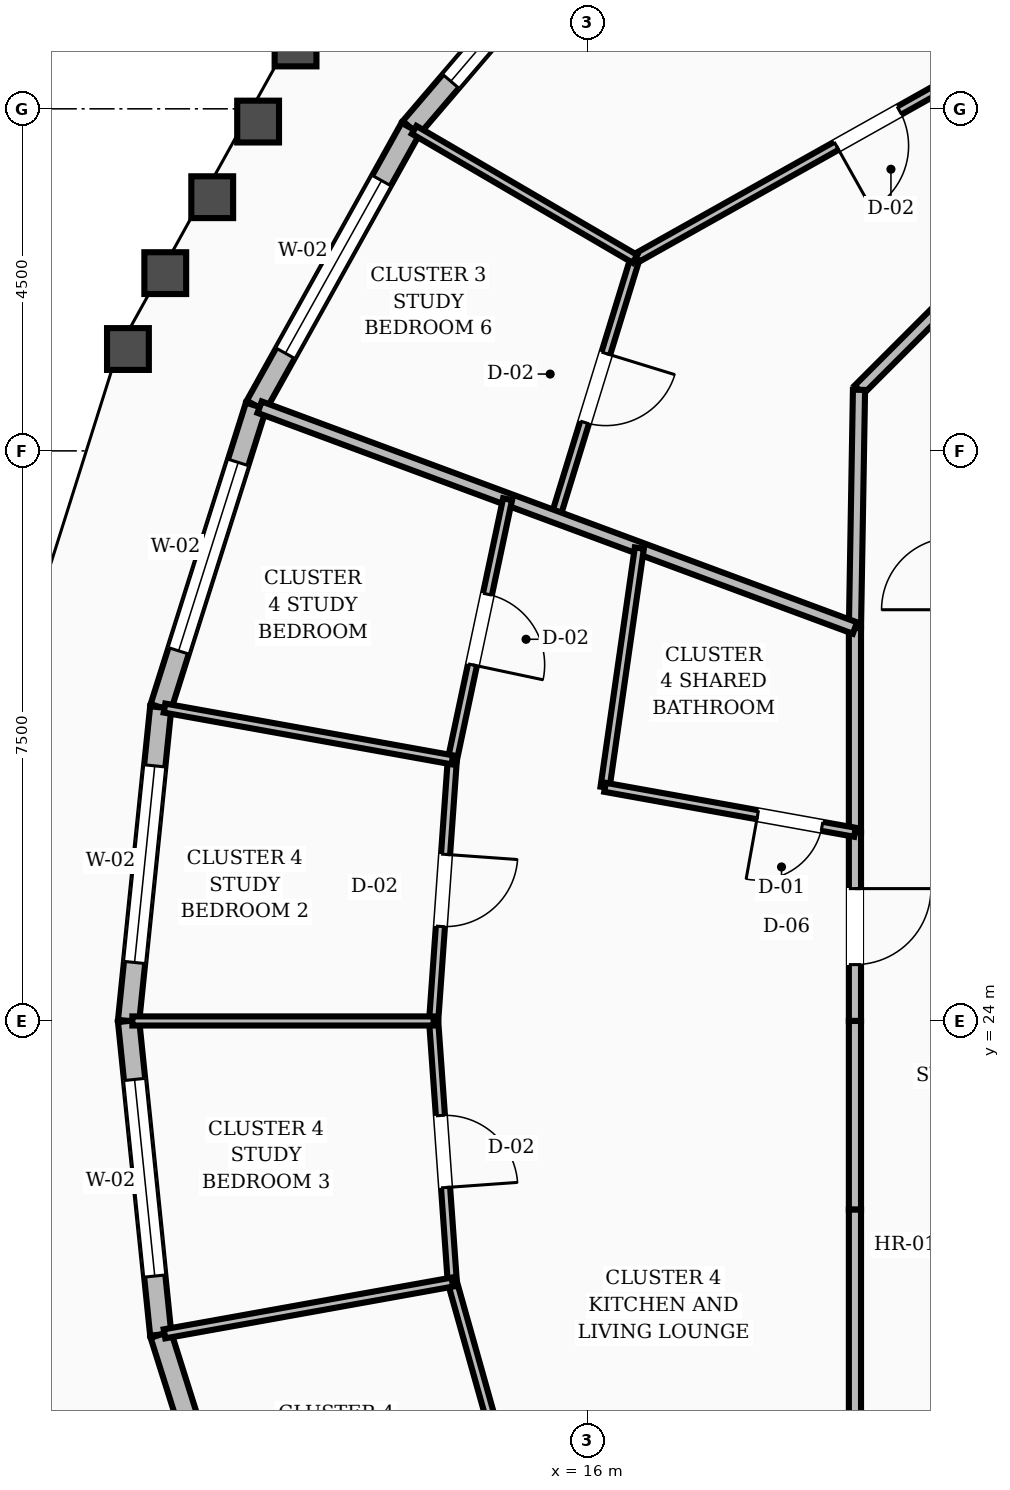
"""IFC4 building model, lengths in metres.
Left out: names, types, materials, properties, quantities, classifications, styles, units other than length and angle.
Written with IfcOpenShell. Run it as: python <this file> out.ifc"""

import sys

from ifc_helpers import new_model, si_unit, direction, frame, frame_2d, origin, place, context, subcontext, project, spatial, rectangle, extrude, element, fill, save


model = new_model("IFC4")
c1 = context("Model", 3, precision=1e-05, world=origin(), true_north=direction((0.0, 1.0)))
c2 = subcontext(c1, "Body", "Model", "MODEL_VIEW")
j1 = project(units=[si_unit("LENGTHUNIT", "METRE"), si_unit("PLANEANGLEUNIT", "RADIAN")], contexts=[c1])
p1 = place(None, origin())
s1 = spatial("IfcSite", under=j1, at=p1, CompositionType="ELEMENT")
p2 = place(p1, origin())
s2 = spatial("IfcBuilding", under=s1, at=p2, CompositionType="ELEMENT")
p3 = place(p2, frame((0.0, 0.0, 236.4)))
s3 = spatial("IfcBuildingStorey", under=s2, at=p3, CompositionType="ELEMENT", Elevation=236.4)
p4 = place(p3, frame((16.418, 38.953, 0.0), z_axis=(0.0, 0.0, 1.0), x_axis=(-0.64992790189, -0.759995869952, 0.0)))
e1 = element("IfcWall", 1, at=p4, inside=s3, PredefinedType="STANDARD", context=c2, shape_type="SweptSolid", body=[
    extrude(rectangle(XDim=4.217, YDim=0.28, at=frame_2d((2.108, 0.0))), origin(), (0.0, 0.0, 1.0), 2.88),
])
p5 = place(p4, frame((0.808, 0.0, 0.8)))
e2 = element("IfcOpeningElement", 2, at=p5, cuts=e1, PredefinedType="OPENING", context=c2, shape_type="SweptSolid", body=[
    extrude(rectangle(XDim=2.6, YDim=1.65, at=frame_2d((1.3, 0.825))), frame((0.0, 0.15, 0.0), z_axis=(0.0, -1.0, 0.0), x_axis=(1.0, 0.0, 0.0)), (0.0, 0.0, 1.0), 0.3),
])
p6 = place(p3, frame((13.677, 35.748, 0.0), z_axis=(0.0, 0.0, 1.0), x_axis=(-0.486628377496, -0.873609078602, 0.0)))
e3 = element("IfcWall", 3, at=p6, inside=s3, PredefinedType="STANDARD", context=c2, shape_type="SweptSolid", body=[
    extrude(rectangle(XDim=4.185, YDim=0.28, at=frame_2d((2.092, 0.0))), origin(), (0.0, 0.0, 1.0), 2.88),
])
p7 = place(p6, frame((0.792, 0.0, 0.8)))
e4 = element("IfcOpeningElement", 4, at=p7, cuts=e3, PredefinedType="OPENING", context=c2, shape_type="SweptSolid", body=[
    extrude(rectangle(XDim=2.6, YDim=1.65, at=frame_2d((1.3, 0.825))), frame((0.0, 0.15, 0.0), z_axis=(0.0, -1.0, 0.0), x_axis=(1.0, 0.0, 0.0)), (0.0, 0.0, 1.0), 0.3),
])
p8 = place(p3, frame((11.641, 32.092, 0.0), z_axis=(0.0, 0.0, 1.0), x_axis=(-0.301400977057, -0.953497483494, 0.0)))
e5 = element("IfcWall", 5, at=p8, inside=s3, PredefinedType="STANDARD", context=c2, shape_type="SweptSolid", body=[
    extrude(rectangle(XDim=4.16, YDim=0.28, at=frame_2d((2.08, 0.0))), origin(), (0.0, 0.0, 1.0), 2.88),
])
p9 = place(p8, frame((0.78, 0.0, 0.8)))
e6 = element("IfcOpeningElement", 6, at=p9, cuts=e5, PredefinedType="OPENING", context=c2, shape_type="SweptSolid", body=[
    extrude(rectangle(XDim=2.6, YDim=1.65, at=frame_2d((1.3, 0.825))), frame((0.0, 0.15, 0.0), z_axis=(0.0, -1.0, 0.0), x_axis=(1.0, 0.0, 0.0)), (0.0, 0.0, 1.0), 0.3),
])
p10 = place(p3, frame((10.387, 28.125, 0.0), z_axis=(0.0, 0.0, 1.0), x_axis=(-0.102137908712, -0.994770248652, 0.0)))
e7 = element("IfcWall", 7, at=p10, inside=s3, PredefinedType="STANDARD", context=c2, shape_type="SweptSolid", body=[
    extrude(rectangle(XDim=4.147, YDim=0.28, at=frame_2d((2.074, 0.0))), origin(), (0.0, 0.0, 1.0), 2.88),
])
p11 = place(p10, frame((0.773, 0.0, 0.8)))
e8 = element("IfcOpeningElement", 8, at=p11, cuts=e7, PredefinedType="OPENING", context=c2, shape_type="SweptSolid", body=[
    extrude(rectangle(XDim=2.6, YDim=1.65, at=frame_2d((1.3, 0.825))), frame((0.0, 0.15, 0.0), z_axis=(0.0, -1.0, 0.0), x_axis=(1.0, 0.0, 0.0)), (0.0, 0.0, 1.0), 0.3),
])
p12 = place(p3, frame((9.964, 24.0, 0.0), z_axis=(0.0, 0.0, 1.0), x_axis=(0.102137908712, -0.994770248652, 0.0)))
e9 = element("IfcWall", 9, at=p12, inside=s3, PredefinedType="STANDARD", context=c2, shape_type="SweptSolid", body=[
    extrude(rectangle(XDim=4.147, YDim=0.28, at=frame_2d((2.074, 0.0))), origin(), (0.0, 0.0, 1.0), 2.88),
])
p13 = place(p12, frame((0.773, 0.0, 0.8)))
e10 = element("IfcOpeningElement", 10, at=p13, cuts=e9, PredefinedType="OPENING", context=c2, shape_type="SweptSolid", body=[
    extrude(rectangle(XDim=2.6, YDim=1.65, at=frame_2d((1.3, 0.825))), frame((0.0, 0.15, 0.0), z_axis=(0.0, -1.0, 0.0), x_axis=(1.0, 0.0, 0.0)), (0.0, 0.0, 1.0), 0.3),
])
p14 = place(p3, frame((10.387, 19.875, 0.0), z_axis=(0.0, 0.0, 1.0), x_axis=(0.301400977057, -0.953497483494, 0.0)))
e11 = element("IfcWall", 11, at=p14, inside=s3, PredefinedType="STANDARD", context=c2, shape_type="SweptSolid", body=[
    extrude(rectangle(XDim=4.16, YDim=0.28, at=frame_2d((2.08, 0.0))), origin(), (0.0, 0.0, 1.0), 2.88),
])
p15 = place(p3, frame((21.635, 34.365, 0.0), z_axis=(0.0, 0.0, 1.0), x_axis=(-0.707106781187, -0.707106781187, 0.0)))
e12 = element("IfcWall", 12, at=p15, inside=s3, PredefinedType="SOLIDWALL", context=c2, shape_type="SweptSolid", body=[
    extrude(rectangle(XDim=2.916, YDim=0.16, at=frame_2d((1.458, 0.0))), origin(), (0.0, 0.0, 1.0), 2.87),
])
p16 = place(p3, frame((19.573, 32.303, 0.0), z_axis=(0.0, 0.0, 1.0), x_axis=(-0.016981035134, -0.999855811828, 0.0)))
e13 = element("IfcWall", 13, at=p16, inside=s3, PredefinedType="SOLIDWALL", context=c2, shape_type="SweptSolid", body=[
    extrude(rectangle(XDim=3.134, YDim=0.16, at=frame_2d((1.567, 0.0))), origin(), (0.0, 0.0, 1.0), 2.87),
])
p17 = place(p3, frame((19.52, 29.169, 0.0), z_axis=(0.0, 0.0, 1.0), x_axis=(0.0, -1.0, 0.0)))
e14 = element("IfcWall", 14, at=p17, inside=s3, PredefinedType="SOLIDWALL", context=c2, shape_type="SweptSolid", body=[
    extrude(rectangle(XDim=2.687, YDim=0.16, at=frame_2d((1.344, 0.0))), origin(), (0.0, 0.0, 1.0), 2.87),
])
p18 = place(p3, frame((19.52, 26.482, 0.0), z_axis=(0.0, 0.0, 1.0), x_axis=(0.0, -1.0, 0.0)))
e15 = element("IfcWall", 15, at=p18, inside=s3, PredefinedType="SOLIDWALL", context=c2, shape_type="SweptSolid", body=[
    extrude(rectangle(XDim=2.482, YDim=0.16, at=frame_2d((1.241, 0.0))), origin(), (0.0, 0.0, 1.0), 2.87),
])
p19 = place(p18, frame((0.741, 0.0, 0.0)))
e16 = element("IfcOpeningElement", 16, at=p19, cuts=e15, PredefinedType="OPENING", context=c2, shape_type="SweptSolid", body=[
    extrude(rectangle(XDim=1.0, YDim=2.1, at=frame_2d((0.5, 1.05))), frame((0.0, 0.09, 0.0), z_axis=(0.0, -1.0, 0.0), x_axis=(1.0, 0.0, 0.0)), (0.0, 0.0, 1.0), 0.18),
])
p20 = place(p3, frame((19.52, 24.0, 0.0), z_axis=(0.0, 0.0, 1.0), x_axis=(0.0, -1.0, 0.0)))
e17 = element("IfcWall", 17, at=p20, inside=s3, PredefinedType="SOLIDWALL", context=c2, shape_type="SweptSolid", body=[
    extrude(rectangle(XDim=2.482, YDim=0.16, at=frame_2d((1.241, 0.0))), origin(), (0.0, 0.0, 1.0), 2.87),
])
p21 = place(p3, frame((19.52, 21.518, 0.0), z_axis=(0.0, 0.0, 1.0), x_axis=(0.0, -1.0, 0.0)))
e18 = element("IfcWall", 18, at=p21, inside=s3, PredefinedType="SOLIDWALL", context=c2, shape_type="SweptSolid", body=[
    extrude(rectangle(XDim=2.687, YDim=0.16, at=frame_2d((1.344, 0.0))), origin(), (0.0, 0.0, 1.0), 2.87),
])
p22 = place(p3, frame((22.755, 37.466, 0.0), z_axis=(0.0, 0.0, 1.0), x_axis=(-0.872022279864, -0.489466182102, 0.0)))
e19 = element("IfcWall", 19, at=p22, inside=s3, PredefinedType="PARTITIONING", context=c2, shape_type="SweptSolid", body=[
    extrude(rectangle(XDim=7.029, YDim=0.12, at=frame_2d((3.515, 0.0))), origin(), (0.0, 0.0, 1.0), 2.87),
])
p23 = place(p22, frame((3.04, 0.0, 0.0)))
e20 = element("IfcOpeningElement", 20, at=p23, cuts=e19, PredefinedType="OPENING", context=c2, shape_type="SweptSolid", body=[
    extrude(rectangle(XDim=0.95, YDim=2.1, at=frame_2d((0.475, 1.05))), frame((0.0, 0.07, 0.0), z_axis=(0.0, -1.0, 0.0), x_axis=(1.0, 0.0, 0.0)), (0.0, 0.0, 1.0), 0.14),
])
p24 = place(p3, frame((16.625, 34.026, 0.0), z_axis=(0.0, 0.0, 1.0), x_axis=(-0.294182446775, -0.955749280936, 0.0)))
e21 = element("IfcWall", 21, at=p24, inside=s3, PredefinedType="PARTITIONING", context=c2, shape_type="SweptSolid", body=[
    extrude(rectangle(XDim=3.552, YDim=0.12, at=frame_2d((1.776, 0.0))), origin(), (0.0, 0.0, 1.0), 2.87),
])
p25 = place(p24, frame((1.301, 0.0, 0.0)))
e22 = element("IfcOpeningElement", 22, at=p25, cuts=e21, PredefinedType="OPENING", context=c2, shape_type="SweptSolid", body=[
    extrude(rectangle(XDim=0.95, YDim=2.1, at=frame_2d((0.475, 1.05))), frame((0.0, 0.07, 0.0), z_axis=(0.0, -1.0, 0.0), x_axis=(1.0, 0.0, 0.0)), (0.0, 0.0, 1.0), 0.14),
])
p26 = place(p3, frame((16.625, 34.026, 0.0), z_axis=(0.0, 0.0, 1.0), x_axis=(-0.863415459889, 0.504493551618, 0.0)))
e23 = element("IfcWall", 23, at=p26, inside=s3, PredefinedType="PARTITIONING", context=c2, shape_type="SweptSolid", body=[
    extrude(rectangle(XDim=3.364, YDim=0.12, at=frame_2d((1.682, 0.0))), origin(), (0.0, 0.0, 1.0), 2.87),
])
p27 = place(p3, frame((19.52, 29.169, 0.0), z_axis=(0.0, 0.0, 1.0), x_axis=(-0.93756283665, 0.347815938871, 0.0)))
e24 = element("IfcWall", 24, at=p27, inside=s3, PredefinedType="SOLIDWALL", context=c2, shape_type="SweptSolid", body=[
    extrude(rectangle(XDim=8.354, YDim=0.16, at=frame_2d((4.177, 0.0))), origin(), (0.0, 0.0, 1.0), 2.87),
])
p28 = place(p3, frame((16.684, 30.222, 0.0), z_axis=(0.0, 0.0, 1.0), x_axis=(-0.141958767182, -0.989872571809, 0.0)))
e25 = element("IfcWall", 25, at=p28, inside=s3, PredefinedType="PARTITIONING", context=c2, shape_type="SweptSolid", body=[
    extrude(rectangle(XDim=3.18, YDim=0.12, at=frame_2d((1.59, 0.0))), origin(), (0.0, 0.0, 1.0), 2.87),
])
p29 = place(p3, frame((19.52, 26.482, 0.0), z_axis=(0.0, 0.0, 1.0), x_axis=(-0.984196827571, 0.177077961922, 0.0)))
e26 = element("IfcWall", 26, at=p29, inside=s3, PredefinedType="PARTITIONING", context=c2, shape_type="SweptSolid", body=[
    extrude(rectangle(XDim=3.341, YDim=0.12, at=frame_2d((1.67, 0.0))), origin(), (0.0, 0.0, 1.0), 2.87),
])
p30 = place(p29, frame((0.44, 0.0, 0.0)))
e27 = element("IfcOpeningElement", 27, at=p30, cuts=e26, PredefinedType="OPENING", context=c2, shape_type="SweptSolid", body=[
    extrude(rectangle(XDim=0.86, YDim=2.1, at=frame_2d((0.43, 1.05))), frame((0.0, 0.07, 0.0), z_axis=(0.0, -1.0, 0.0), x_axis=(1.0, 0.0, 0.0)), (0.0, 0.0, 1.0), 0.14),
])
p31 = place(p3, frame((14.95, 30.865, 0.0), z_axis=(0.0, 0.0, 1.0), x_axis=(-0.207459780038, -0.978243548237, 0.0)))
e28 = element("IfcWall", 28, at=p31, inside=s3, PredefinedType="PARTITIONING", context=c2, shape_type="SweptSolid", body=[
    extrude(rectangle(XDim=3.506, YDim=0.12, at=frame_2d((1.753, 0.0))), origin(), (0.0, 0.0, 1.0), 2.87),
])
p32 = place(p31, frame((1.278, 0.0, 0.0)))
e29 = element("IfcOpeningElement", 29, at=p32, cuts=e28, PredefinedType="OPENING", context=c2, shape_type="SweptSolid", body=[
    extrude(rectangle(XDim=0.95, YDim=2.1, at=frame_2d((0.475, 1.05))), frame((0.0, 0.07, 0.0), z_axis=(0.0, -1.0, 0.0), x_axis=(1.0, 0.0, 0.0)), (0.0, 0.0, 1.0), 0.14),
])
p33 = place(p3, frame((14.223, 27.435, 0.0), z_axis=(0.0, 0.0, 1.0), x_axis=(-0.071312539547, -0.997454019844, 0.0)))
e30 = element("IfcWall", 30, at=p33, inside=s3, PredefinedType="PARTITIONING", context=c2, shape_type="SweptSolid", body=[
    extrude(rectangle(XDim=3.444, YDim=0.12, at=frame_2d((1.722, 0.0))), origin(), (0.0, 0.0, 1.0), 2.87),
])
p34 = place(p33, frame((1.247, 0.0, 0.0)))
e31 = element("IfcOpeningElement", 31, at=p34, cuts=e30, PredefinedType="OPENING", context=c2, shape_type="SweptSolid", body=[
    extrude(rectangle(XDim=0.95, YDim=2.1, at=frame_2d((0.475, 1.05))), frame((0.0, 0.07, 0.0), z_axis=(0.0, -1.0, 0.0), x_axis=(1.0, 0.0, 0.0)), (0.0, 0.0, 1.0), 0.14),
])
p35 = place(p3, frame((14.223, 27.435, 0.0), z_axis=(0.0, 0.0, 1.0), x_axis=(-0.984203232283, 0.177042360933, 0.0)))
e32 = element("IfcWall", 32, at=p35, inside=s3, PredefinedType="PARTITIONING", context=c2, shape_type="SweptSolid", body=[
    extrude(rectangle(XDim=3.847, YDim=0.12, at=frame_2d((1.924, 0.0))), origin(), (0.0, 0.0, 1.0), 2.87),
])
p36 = place(p3, frame((13.977, 24.0, 0.0), z_axis=(0.0, 0.0, 1.0), x_axis=(0.071312539547, -0.997454019844, 0.0)))
e33 = element("IfcWall", 33, at=p36, inside=s3, PredefinedType="PARTITIONING", context=c2, shape_type="SweptSolid", body=[
    extrude(rectangle(XDim=3.444, YDim=0.12, at=frame_2d((1.722, 0.0))), origin(), (0.0, 0.0, 1.0), 2.87),
])
p37 = place(p36, frame((1.247, 0.0, 0.0)))
e34 = element("IfcOpeningElement", 34, at=p37, cuts=e33, PredefinedType="OPENING", context=c2, shape_type="SweptSolid", body=[
    extrude(rectangle(XDim=0.95, YDim=2.1, at=frame_2d((0.475, 1.05))), frame((0.0, 0.07, 0.0), z_axis=(0.0, -1.0, 0.0), x_axis=(1.0, 0.0, 0.0)), (0.0, 0.0, 1.0), 0.14),
])
p38 = place(p3, frame((13.977, 24.0, 0.0), z_axis=(0.0, 0.0, 1.0), x_axis=(-1.0, 0.0, 0.0)))
e35 = element("IfcWall", 35, at=p38, inside=s3, PredefinedType="PARTITIONING", context=c2, shape_type="SweptSolid", body=[
    extrude(rectangle(XDim=3.964, YDim=0.12, at=frame_2d((1.982, 0.0))), origin(), (0.0, 0.0, 1.0), 2.87),
])
p39 = place(p3, frame((14.223, 20.565, 0.0), z_axis=(0.0, 0.0, 1.0), x_axis=(0.270726742506, -0.962656237134, 0.0)))
e36 = element("IfcWall", 36, at=p39, inside=s3, PredefinedType="PARTITIONING", context=c2, shape_type="SweptSolid", body=[
    extrude(rectangle(XDim=7.132, YDim=0.12, at=frame_2d((3.566, 0.0))), origin(), (0.0, 0.0, 1.0), 2.87),
])
p40 = place(p39, frame((3.091, 0.0, 0.0)))
e37 = element("IfcOpeningElement", 37, at=p40, cuts=e36, PredefinedType="OPENING", context=c2, shape_type="SweptSolid", body=[
    extrude(rectangle(XDim=0.95, YDim=2.1, at=frame_2d((0.475, 1.05))), frame((0.0, 0.07, 0.0), z_axis=(0.0, -1.0, 0.0), x_axis=(1.0, 0.0, 0.0)), (0.0, 0.0, 1.0), 0.14),
])
p41 = place(p3, frame((14.223, 20.565, 0.0), z_axis=(0.0, 0.0, 1.0), x_axis=(-0.984203232283, -0.177042360933, 0.0)))
e38 = element("IfcWall", 38, at=p41, inside=s3, PredefinedType="PARTITIONING", context=c2, shape_type="SweptSolid", body=[
    extrude(rectangle(XDim=3.847, YDim=0.12, at=frame_2d((1.924, 0.0))), origin(), (0.0, 0.0, 1.0), 2.87),
])
p42 = place(p5, origin())
e39 = element("IfcWindow", 39, at=p42, inside=s3, PartitioningType="SINGLE_PANEL", PredefinedType="WINDOW", context=c2, shape_type="SweptSolid", body=[
    extrude(rectangle(XDim=2.6, YDim=1.65, at=frame_2d((1.3, 0.825))), frame((0.0, 0.03, 0.0), z_axis=(0.0, -1.0, 0.0), x_axis=(1.0, 0.0, 0.0)), (0.0, 0.0, 1.0), 0.06),
])
fill(e2, e39)
p43 = place(p7, origin())
e40 = element("IfcWindow", 40, at=p43, inside=s3, PartitioningType="SINGLE_PANEL", PredefinedType="WINDOW", context=c2, shape_type="SweptSolid", body=[
    extrude(rectangle(XDim=2.6, YDim=1.65, at=frame_2d((1.3, 0.825))), frame((0.0, 0.03, 0.0), z_axis=(0.0, -1.0, 0.0), x_axis=(1.0, 0.0, 0.0)), (0.0, 0.0, 1.0), 0.06),
])
fill(e4, e40)
p44 = place(p9, origin())
e41 = element("IfcWindow", 41, at=p44, inside=s3, PartitioningType="SINGLE_PANEL", PredefinedType="WINDOW", context=c2, shape_type="SweptSolid", body=[
    extrude(rectangle(XDim=2.6, YDim=1.65, at=frame_2d((1.3, 0.825))), frame((0.0, 0.03, 0.0), z_axis=(0.0, -1.0, 0.0), x_axis=(1.0, 0.0, 0.0)), (0.0, 0.0, 1.0), 0.06),
])
fill(e6, e41)
p45 = place(p11, origin())
e42 = element("IfcWindow", 42, at=p45, inside=s3, PartitioningType="SINGLE_PANEL", PredefinedType="WINDOW", context=c2, shape_type="SweptSolid", body=[
    extrude(rectangle(XDim=2.6, YDim=1.65, at=frame_2d((1.3, 0.825))), frame((0.0, 0.03, 0.0), z_axis=(0.0, -1.0, 0.0), x_axis=(1.0, 0.0, 0.0)), (0.0, 0.0, 1.0), 0.06),
])
fill(e8, e42)
p46 = place(p13, origin())
e43 = element("IfcWindow", 43, at=p46, inside=s3, PartitioningType="SINGLE_PANEL", PredefinedType="WINDOW", context=c2, shape_type="SweptSolid", body=[
    extrude(rectangle(XDim=2.6, YDim=1.65, at=frame_2d((1.3, 0.825))), frame((0.0, 0.03, 0.0), z_axis=(0.0, -1.0, 0.0), x_axis=(1.0, 0.0, 0.0)), (0.0, 0.0, 1.0), 0.06),
])
fill(e10, e43)
p47 = place(p23, origin())
e44 = element("IfcDoor", 44, at=p47, inside=s3, OperationType="SINGLE_SWING_RIGHT", PredefinedType="DOOR", context=c2, shape_type="SweptSolid", body=[
    extrude(rectangle(XDim=0.95, YDim=2.1, at=frame_2d((0.475, 1.05))), frame((0.0, 0.025, 0.0), z_axis=(0.0, -1.0, 0.0), x_axis=(1.0, 0.0, 0.0)), (0.0, 0.0, 1.0), 0.05),
])
fill(e20, e44)
p48 = place(p25, origin())
e45 = element("IfcDoor", 45, at=p48, inside=s3, OperationType="SINGLE_SWING_LEFT", PredefinedType="DOOR", context=c2, shape_type="SweptSolid", body=[
    extrude(rectangle(XDim=0.95, YDim=2.1, at=frame_2d((0.475, 1.05))), frame((0.0, 0.025, 0.0), z_axis=(0.0, -1.0, 0.0), x_axis=(1.0, 0.0, 0.0)), (0.0, 0.0, 1.0), 0.05),
])
fill(e22, e45)
p49 = place(p30, origin())
e46 = element("IfcDoor", 46, at=p49, inside=s3, OperationType="SINGLE_SWING_RIGHT", PredefinedType="DOOR", context=c2, shape_type="SweptSolid", body=[
    extrude(rectangle(XDim=0.86, YDim=2.1, at=frame_2d((0.43, 1.05))), frame((0.0, 0.025, 0.0), z_axis=(0.0, -1.0, 0.0), x_axis=(1.0, 0.0, 0.0)), (0.0, 0.0, 1.0), 0.05),
])
fill(e27, e46)
p50 = place(p19, origin())
e47 = element("IfcDoor", 47, at=p50, inside=s3, OperationType="SINGLE_SWING_LEFT", PredefinedType="DOOR", context=c2, shape_type="SweptSolid", body=[
    extrude(rectangle(XDim=1.0, YDim=2.1, at=frame_2d((0.5, 1.05))), frame((0.0, 0.025, 0.0), z_axis=(0.0, -1.0, 0.0), x_axis=(1.0, 0.0, 0.0)), (0.0, 0.0, 1.0), 0.05),
])
fill(e16, e47)
p51 = place(p32, origin())
e48 = element("IfcDoor", 48, at=p51, inside=s3, OperationType="SINGLE_SWING_RIGHT", PredefinedType="DOOR", context=c2, shape_type="SweptSolid", body=[
    extrude(rectangle(XDim=0.95, YDim=2.1, at=frame_2d((0.475, 1.05))), frame((0.0, 0.025, 0.0), z_axis=(0.0, -1.0, 0.0), x_axis=(1.0, 0.0, 0.0)), (0.0, 0.0, 1.0), 0.05),
])
fill(e29, e48)
p52 = place(p34, origin())
e49 = element("IfcDoor", 49, at=p52, inside=s3, OperationType="SINGLE_SWING_LEFT", PredefinedType="DOOR", context=c2, shape_type="SweptSolid", body=[
    extrude(rectangle(XDim=0.95, YDim=2.1, at=frame_2d((0.475, 1.05))), frame((0.0, 0.025, 0.0), z_axis=(0.0, -1.0, 0.0), x_axis=(1.0, 0.0, 0.0)), (0.0, 0.0, 1.0), 0.05),
])
fill(e31, e49)
p53 = place(p37, origin())
e50 = element("IfcDoor", 50, at=p53, inside=s3, OperationType="SINGLE_SWING_RIGHT", PredefinedType="DOOR", context=c2, shape_type="SweptSolid", body=[
    extrude(rectangle(XDim=0.95, YDim=2.1, at=frame_2d((0.475, 1.05))), frame((0.0, 0.025, 0.0), z_axis=(0.0, -1.0, 0.0), x_axis=(1.0, 0.0, 0.0)), (0.0, 0.0, 1.0), 0.05),
])
fill(e34, e50)
save(model, sys.argv[1])
